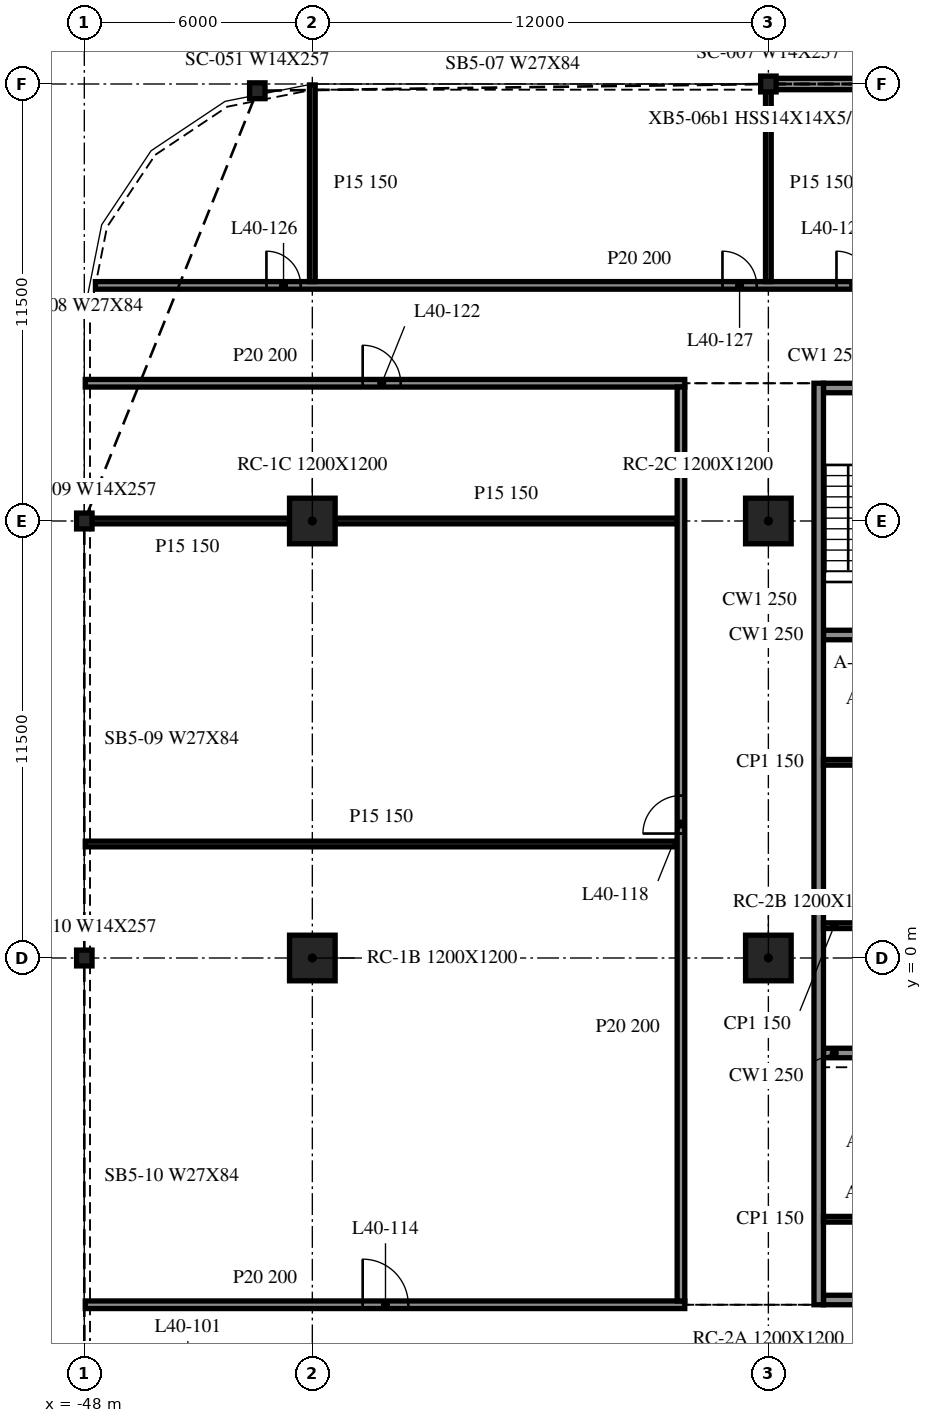
"""IFC4 building model, lengths in metres.
Left out: names, types, materials, properties, quantities, classifications, styles, units other than length and angle.
Written with IfcOpenShell. Run it as: python <this file> out.ifc"""

import sys

from ifc_helpers import new_model, si_unit, direction, frame, frame_2d, origin, origin_2d, place, context, subcontext, project, spatial, rectangle, i_section, extrude, element, fill, save


model = new_model("IFC4")
c1 = context("Model", 3, precision=1e-05, world=origin(), true_north=direction((0.0, 1.0)))
c2 = subcontext(c1, "Body", "Model", "MODEL_VIEW")
j1 = project(units=[si_unit("LENGTHUNIT", "METRE"), si_unit("PLANEANGLEUNIT", "RADIAN")], contexts=[c1])
p1 = place(None, origin())
s1 = spatial("IfcSite", under=j1, at=p1, CompositionType="ELEMENT")
p2 = place(p1, origin())
s2 = spatial("IfcBuilding", under=s1, at=p2, CompositionType="ELEMENT")
p3 = place(p2, frame((0.0, 0.0, 170.6)))
s3 = spatial("IfcBuildingStorey", under=s2, at=p3, CompositionType="ELEMENT", Elevation=170.6)
for number, where, z_axis, x_axis in (
    (1, (-42.0, 0.0, -0.34), (0.0, 0.0, 1.0), (1.0, 0.0, 0.0)),
    (2, (-42.0, 11.5, -0.34), (0.0, 0.0, 1.0), (1.0, 0.0, 0.0)),
    (3, (-30.0, 0.0, -0.34), (0.0, 0.0, 1.0), (1.0, 0.0, 0.0)),
    (4, (-30.0, 11.5, -0.34), (0.0, 0.0, 1.0), (1.0, 0.0, 0.0)),
):
    element("IfcColumn", number, at=place(p3, frame(where, z_axis=z_axis, x_axis=x_axis)), inside=s3, PredefinedType="COLUMN", context=c2, shape_type="SweptSolid", body=[
        extrude(rectangle(XDim=1.2, YDim=1.2, at=origin_2d()), origin(), (0.0, 0.0, 1.0), 3.8),
    ])
for number, where, z_axis, x_axis in (
    (5, (-30.0, 23.0, -0.34), (0.0, 0.0, 1.0), (1.0, 0.0, 0.0)),
    (6, (-43.448, 22.822, -0.34), (0.0, 0.0, 1.0), (1.0, 0.0, 0.0)),
    (7, (-48.0, 11.5, -0.34), (0.0, 0.0, 1.0), (1.0, 0.0, 0.0)),
    (8, (-48.0, 0.0, -0.34), (0.0, 0.0, 1.0), (1.0, 0.0, 0.0)),
):
    element("IfcColumn", number, at=place(p3, frame(where, z_axis=z_axis, x_axis=x_axis)), inside=s3, PredefinedType="COLUMN", context=c2, shape_type="SweptSolid", body=[
        extrude(i_section(OverallWidth=0.406, OverallDepth=0.417, WebThickness=0.03, FlangeThickness=0.048, at=origin_2d()), origin(), (0.0, 0.0, 1.0), 3.8),
    ])
p4 = place(p3, frame((-18.015, 23.0, 0.0), z_axis=(0.0, 0.0, 1.0), x_axis=(-1.0, 0.0, 0.0)))
e9 = element("IfcWall", 9, at=p4, inside=s3, PredefinedType="NOTDEFINED", context=c2, shape_type="SweptSolid", body=[
    extrude(rectangle(XDim=11.97, YDim=0.3, at=frame_2d((5.985, 0.0))), origin(), (0.0, 0.0, 1.0), 2.782),
])
p5 = place(p3, frame((-28.675, 15.125, 0.0), z_axis=(0.0, 0.0, 1.0), x_axis=(0.0, -1.0, 0.0)))
e10 = element("IfcWall", 10, at=p5, inside=s3, PredefinedType="SOLIDWALL", context=c2, shape_type="SweptSolid", body=[
    extrude(rectangle(XDim=24.25, YDim=0.25, at=frame_2d((12.125, 0.0))), origin(), (0.0, 0.0, 1.0), 3.46),
])
p6 = place(p3, frame((-19.45, -9.0, 0.0), z_axis=(0.0, 0.0, 1.0), x_axis=(-1.0, 0.0, 0.0)))
e11 = element("IfcWall", 11, at=p6, inside=s3, PredefinedType="SOLIDWALL", context=c2, shape_type="SweptSolid", body=[
    extrude(rectangle(XDim=9.1, YDim=0.25, at=frame_2d((4.55, 0.0))), origin(), (0.0, 0.0, 1.0), 3.46),
])
p7 = place(p6, frame((3.65, 0.0, 0.0)))
e12 = element("IfcOpeningElement", 12, at=p7, cuts=e11, PredefinedType="OPENING", context=c2, shape_type="SweptSolid", body=[
    extrude(rectangle(XDim=1.8, YDim=2.1, at=frame_2d((0.9, 1.05))), frame((0.0, 0.135, 0.0), z_axis=(0.0, -1.0, 0.0), x_axis=(1.0, 0.0, 0.0)), (0.0, 0.0, 1.0), 0.27),
])
p8 = place(p3, frame((-28.55, 15.0, 0.0), z_axis=(0.0, 0.0, 1.0), x_axis=(1.0, 0.0, 0.0)))
e13 = element("IfcWall", 13, at=p8, inside=s3, PredefinedType="SOLIDWALL", context=c2, shape_type="SweptSolid", body=[
    extrude(rectangle(XDim=9.1, YDim=0.25, at=frame_2d((4.55, 0.0))), origin(), (0.0, 0.0, 1.0), 3.46),
])
p9 = place(p8, frame((3.65, 0.0, 0.0)))
e14 = element("IfcOpeningElement", 14, at=p9, cuts=e13, PredefinedType="OPENING", context=c2, shape_type="SweptSolid", body=[
    extrude(rectangle(XDim=1.8, YDim=2.1, at=frame_2d((0.9, 1.05))), frame((0.0, 0.135, 0.0), z_axis=(0.0, -1.0, 0.0), x_axis=(1.0, 0.0, 0.0)), (0.0, 0.0, 1.0), 0.27),
])
for number, where, z_axis, x_axis in (
    (15, (-28.55, -2.5, 0.0), (0.0, 0.0, 1.0), (1.0, 0.0, 0.0)),
    (16, (-28.55, 8.5, 0.0), (0.0, 0.0, 1.0), (1.0, 0.0, 0.0)),
):
    element("IfcWall", number, at=place(p3, frame(where, z_axis=z_axis, x_axis=x_axis)), inside=s3, PredefinedType="SOLIDWALL", context=c2, shape_type="SweptSolid", body=[
        extrude(rectangle(XDim=2.85, YDim=0.25, at=frame_2d((1.425, 0.0))), origin(), (0.0, 0.0, 1.0), 3.46),
    ])
for number, where, z_axis, x_axis in (
    (17, (-28.55, 0.85, 0.0), (0.0, 0.0, 1.0), (1.0, 0.0, 0.0)),
    (18, (-28.55, 5.15, 0.0), (0.0, 0.0, 1.0), (1.0, 0.0, 0.0)),
    (19, (-28.55, -6.875, 0.0), (0.0, 0.0, 1.0), (1.0, 0.0, 0.0)),
):
    element("IfcWall", number, at=place(p3, frame(where, z_axis=z_axis, x_axis=x_axis)), inside=s3, PredefinedType="PARTITIONING", context=c2, shape_type="SweptSolid", body=[
        extrude(rectangle(XDim=2.85, YDim=0.15, at=frame_2d((1.425, 0.0))), origin(), (0.0, 0.0, 1.0), 3.46),
    ])
p10 = place(p3, frame((-47.975, -9.125, 0.0), z_axis=(0.0, 0.0, 1.0), x_axis=(1.0, 0.0, 0.0)))
e20 = element("IfcWall", 20, at=p10, inside=s3, PredefinedType="PARTITIONING", context=c2, shape_type="SweptSolid", body=[
    extrude(rectangle(XDim=15.775, YDim=0.2, at=frame_2d((7.888, 0.0))), origin(), (0.0, 0.0, 1.0), 3.46),
])
p11 = place(p10, frame((7.3, 0.0, 0.0)))
e21 = element("IfcOpeningElement", 21, at=p11, cuts=e20, PredefinedType="OPENING", context=c2, shape_type="SweptSolid", body=[
    extrude(rectangle(XDim=1.2, YDim=2.1, at=frame_2d((0.6, 1.05))), frame((0.0, 0.11, 0.0), z_axis=(0.0, -1.0, 0.0), x_axis=(1.0, 0.0, 0.0)), (0.0, 0.0, 1.0), 0.22),
])
p12 = place(p3, frame((-47.975, 3.0, 0.0), z_axis=(0.0, 0.0, 1.0), x_axis=(1.0, 0.0, 0.0)))
e22 = element("IfcWall", 22, at=p12, inside=s3, PredefinedType="PARTITIONING", context=c2, shape_type="SweptSolid", body=[
    extrude(rectangle(XDim=15.575, YDim=0.15, at=frame_2d((7.788, 0.0))), origin(), (0.0, 0.0, 1.0), 3.46),
])
p13 = place(p3, frame((-47.975, 11.5, 0.0), z_axis=(0.0, 0.0, 1.0), x_axis=(1.0, 0.0, 0.0)))
e23 = element("IfcWall", 23, at=p13, inside=s3, PredefinedType="PARTITIONING", context=c2, shape_type="SweptSolid", body=[
    extrude(rectangle(XDim=5.375, YDim=0.15, at=frame_2d((2.688, 0.0))), origin(), (0.0, 0.0, 1.0), 3.46),
])
p14 = place(p3, frame((-41.4, 11.5, 0.0), z_axis=(0.0, 0.0, 1.0), x_axis=(1.0, 0.0, 0.0)))
e24 = element("IfcWall", 24, at=p14, inside=s3, PredefinedType="PARTITIONING", context=c2, shape_type="SweptSolid", body=[
    extrude(rectangle(XDim=9.0, YDim=0.15, at=frame_2d((4.5, 0.0))), origin(), (0.0, 0.0, 1.0), 3.46),
])
p15 = place(p3, frame((-47.975, 15.125, 0.0), z_axis=(0.0, 0.0, 1.0), x_axis=(1.0, 0.0, 0.0)))
e25 = element("IfcWall", 25, at=p15, inside=s3, PredefinedType="PARTITIONING", context=c2, shape_type="SweptSolid", body=[
    extrude(rectangle(XDim=15.775, YDim=0.2, at=frame_2d((7.888, 0.0))), origin(), (0.0, 0.0, 1.0), 3.46),
])
p16 = place(p15, frame((7.3, 0.0, 0.0)))
e26 = element("IfcOpeningElement", 26, at=p16, cuts=e25, PredefinedType="OPENING", context=c2, shape_type="SweptSolid", body=[
    extrude(rectangle(XDim=1.0, YDim=2.1, at=frame_2d((0.5, 1.05))), frame((0.0, 0.11, 0.0), z_axis=(0.0, -1.0, 0.0), x_axis=(1.0, 0.0, 0.0)), (0.0, 0.0, 1.0), 0.22),
])
p17 = place(p3, frame((-47.708, 17.7, 0.0), z_axis=(0.0, 0.0, 1.0), x_axis=(1.0, 0.0, 0.0)))
e27 = element("IfcWall", 27, at=p17, inside=s3, PredefinedType="PARTITIONING", context=c2, shape_type="SweptSolid", body=[
    extrude(rectangle(XDim=95.416, YDim=0.2, at=frame_2d((47.708, 0.0))), origin(), (0.0, 0.0, 1.0), 3.46),
])
p18 = place(p17, frame((4.5, 0.0, 0.0)))
e28 = element("IfcOpeningElement", 28, at=p18, cuts=e27, PredefinedType="OPENING", context=c2, shape_type="SweptSolid", body=[
    extrude(rectangle(XDim=0.9, YDim=2.1, at=frame_2d((0.45, 1.05))), frame((0.0, 0.11, 0.0), z_axis=(0.0, -1.0, 0.0), x_axis=(1.0, 0.0, 0.0)), (0.0, 0.0, 1.0), 0.22),
])
p19 = place(p17, frame((16.5, 0.0, 0.0)))
e29 = element("IfcOpeningElement", 29, at=p19, cuts=e27, PredefinedType="OPENING", context=c2, shape_type="SweptSolid", body=[
    extrude(rectangle(XDim=0.9, YDim=2.1, at=frame_2d((0.45, 1.05))), frame((0.0, 0.11, 0.0), z_axis=(0.0, -1.0, 0.0), x_axis=(1.0, 0.0, 0.0)), (0.0, 0.0, 1.0), 0.22),
])
p20 = place(p17, frame((19.5, 0.0, 0.0)))
e30 = element("IfcOpeningElement", 30, at=p20, cuts=e27, PredefinedType="OPENING", context=c2, shape_type="SweptSolid", body=[
    extrude(rectangle(XDim=0.9, YDim=2.1, at=frame_2d((0.45, 1.05))), frame((0.0, 0.11, 0.0), z_axis=(0.0, -1.0, 0.0), x_axis=(1.0, 0.0, 0.0)), (0.0, 0.0, 1.0), 0.22),
])
p21 = place(p17, frame((22.5, 0.0, 0.0)))
e31 = element("IfcOpeningElement", 31, at=p21, cuts=e27, PredefinedType="OPENING", context=c2, shape_type="SweptSolid", body=[
    extrude(rectangle(XDim=0.9, YDim=2.1, at=frame_2d((0.45, 1.05))), frame((0.0, 0.11, 0.0), z_axis=(0.0, -1.0, 0.0), x_axis=(1.0, 0.0, 0.0)), (0.0, 0.0, 1.0), 0.22),
])
p22 = place(p17, frame((28.5, 0.0, 0.0)))
e32 = element("IfcOpeningElement", 32, at=p22, cuts=e27, PredefinedType="OPENING", context=c2, shape_type="SweptSolid", body=[
    extrude(rectangle(XDim=0.9, YDim=2.1, at=frame_2d((0.45, 1.05))), frame((0.0, 0.11, 0.0), z_axis=(0.0, -1.0, 0.0), x_axis=(1.0, 0.0, 0.0)), (0.0, 0.0, 1.0), 0.22),
])
p23 = place(p17, frame((40.5, 0.0, 0.0)))
e33 = element("IfcOpeningElement", 33, at=p23, cuts=e27, PredefinedType="OPENING", context=c2, shape_type="SweptSolid", body=[
    extrude(rectangle(XDim=0.9, YDim=2.1, at=frame_2d((0.45, 1.05))), frame((0.0, 0.11, 0.0), z_axis=(0.0, -1.0, 0.0), x_axis=(1.0, 0.0, 0.0)), (0.0, 0.0, 1.0), 0.22),
])
p24 = place(p17, frame((43.5, 0.0, 0.0)))
e34 = element("IfcOpeningElement", 34, at=p24, cuts=e27, PredefinedType="OPENING", context=c2, shape_type="SweptSolid", body=[
    extrude(rectangle(XDim=0.9, YDim=2.1, at=frame_2d((0.45, 1.05))), frame((0.0, 0.11, 0.0), z_axis=(0.0, -1.0, 0.0), x_axis=(1.0, 0.0, 0.0)), (0.0, 0.0, 1.0), 0.22),
])
p25 = place(p17, frame((46.5, 0.0, 0.0)))
e35 = element("IfcOpeningElement", 35, at=p25, cuts=e27, PredefinedType="OPENING", context=c2, shape_type="SweptSolid", body=[
    extrude(rectangle(XDim=0.9, YDim=2.1, at=frame_2d((0.45, 1.05))), frame((0.0, 0.11, 0.0), z_axis=(0.0, -1.0, 0.0), x_axis=(1.0, 0.0, 0.0)), (0.0, 0.0, 1.0), 0.22),
])
p26 = place(p17, frame((48.1, 0.0, 0.0)))
e36 = element("IfcOpeningElement", 36, at=p26, cuts=e27, PredefinedType="OPENING", context=c2, shape_type="SweptSolid", body=[
    extrude(rectangle(XDim=0.9, YDim=2.1, at=frame_2d((0.45, 1.05))), frame((0.0, 0.11, 0.0), z_axis=(0.0, -1.0, 0.0), x_axis=(1.0, 0.0, 0.0)), (0.0, 0.0, 1.0), 0.22),
])
p27 = place(p17, frame((54.1, 0.0, 0.0)))
e37 = element("IfcOpeningElement", 37, at=p27, cuts=e27, PredefinedType="OPENING", context=c2, shape_type="SweptSolid", body=[
    extrude(rectangle(XDim=0.9, YDim=2.1, at=frame_2d((0.45, 1.05))), frame((0.0, 0.11, 0.0), z_axis=(0.0, -1.0, 0.0), x_axis=(1.0, 0.0, 0.0)), (0.0, 0.0, 1.0), 0.22),
])
p28 = place(p17, frame((66.1, 0.0, 0.0)))
e38 = element("IfcOpeningElement", 38, at=p28, cuts=e27, PredefinedType="OPENING", context=c2, shape_type="SweptSolid", body=[
    extrude(rectangle(XDim=0.9, YDim=2.1, at=frame_2d((0.45, 1.05))), frame((0.0, 0.11, 0.0), z_axis=(0.0, -1.0, 0.0), x_axis=(1.0, 0.0, 0.0)), (0.0, 0.0, 1.0), 0.22),
])
p29 = place(p17, frame((69.1, 0.0, 0.0)))
e39 = element("IfcOpeningElement", 39, at=p29, cuts=e27, PredefinedType="OPENING", context=c2, shape_type="SweptSolid", body=[
    extrude(rectangle(XDim=0.9, YDim=2.1, at=frame_2d((0.45, 1.05))), frame((0.0, 0.11, 0.0), z_axis=(0.0, -1.0, 0.0), x_axis=(1.0, 0.0, 0.0)), (0.0, 0.0, 1.0), 0.22),
])
p30 = place(p17, frame((72.1, 0.0, 0.0)))
e40 = element("IfcOpeningElement", 40, at=p30, cuts=e27, PredefinedType="OPENING", context=c2, shape_type="SweptSolid", body=[
    extrude(rectangle(XDim=0.9, YDim=2.1, at=frame_2d((0.45, 1.05))), frame((0.0, 0.11, 0.0), z_axis=(0.0, -1.0, 0.0), x_axis=(1.0, 0.0, 0.0)), (0.0, 0.0, 1.0), 0.22),
])
p31 = place(p17, frame((78.1, 0.0, 0.0)))
e41 = element("IfcOpeningElement", 41, at=p31, cuts=e27, PredefinedType="OPENING", context=c2, shape_type="SweptSolid", body=[
    extrude(rectangle(XDim=0.9, YDim=2.1, at=frame_2d((0.45, 1.05))), frame((0.0, 0.11, 0.0), z_axis=(0.0, -1.0, 0.0), x_axis=(1.0, 0.0, 0.0)), (0.0, 0.0, 1.0), 0.22),
])
p32 = place(p17, frame((90.1, 0.0, 0.0)))
e42 = element("IfcOpeningElement", 42, at=p32, cuts=e27, PredefinedType="OPENING", context=c2, shape_type="SweptSolid", body=[
    extrude(rectangle(XDim=0.9, YDim=2.1, at=frame_2d((0.45, 1.05))), frame((0.0, 0.11, 0.0), z_axis=(0.0, -1.0, 0.0), x_axis=(1.0, 0.0, 0.0)), (0.0, 0.0, 1.0), 0.22),
])
p33 = place(p3, frame((-42.0, 17.8, 0.0), z_axis=(0.0, 0.0, 1.0), x_axis=(0.0, 1.0, 0.0)))
e43 = element("IfcWall", 43, at=p33, inside=s3, PredefinedType="PARTITIONING", context=c2, shape_type="SweptSolid", body=[
    extrude(rectangle(XDim=5.175, YDim=0.15, at=frame_2d((2.587, 0.0))), origin(), (0.0, 0.0, 1.0), 3.46),
])
p34 = place(p3, frame((-32.3, -9.025, 0.0), z_axis=(0.0, 0.0, 1.0), x_axis=(0.0, 1.0, 0.0)))
e44 = element("IfcWall", 44, at=p34, inside=s3, PredefinedType="PARTITIONING", context=c2, shape_type="SweptSolid", body=[
    extrude(rectangle(XDim=24.05, YDim=0.2, at=frame_2d((12.025, 0.0))), origin(), (0.0, 0.0, 1.0), 3.46),
])
p35 = place(p34, frame((12.3, 0.0, 0.0)))
e45 = element("IfcOpeningElement", 45, at=p35, cuts=e44, PredefinedType="OPENING", context=c2, shape_type="SweptSolid", body=[
    extrude(rectangle(XDim=1.0, YDim=2.1, at=frame_2d((0.5, 1.05))), frame((0.0, 0.11, 0.0), z_axis=(0.0, -1.0, 0.0), x_axis=(1.0, 0.0, 0.0)), (0.0, 0.0, 1.0), 0.22),
])
p36 = place(p3, frame((-30.0, 17.8, 0.0), z_axis=(0.0, 0.0, 1.0), x_axis=(0.0, 1.0, 0.0)))
e46 = element("IfcWall", 46, at=p36, inside=s3, PredefinedType="PARTITIONING", context=c2, shape_type="SweptSolid", body=[
    extrude(rectangle(XDim=5.175, YDim=0.15, at=frame_2d((2.587, 0.0))), origin(), (0.0, 0.0, 1.0), 3.46),
])
p37 = place(p11, origin())
e47 = element("IfcDoor", 47, at=p37, inside=s3, OperationType="SINGLE_SWING_RIGHT", PredefinedType="DOOR", context=c2, shape_type="SweptSolid", body=[
    extrude(rectangle(XDim=1.2, YDim=2.1, at=frame_2d((0.6, 1.05))), frame((0.0, 0.025, 0.0), z_axis=(0.0, -1.0, 0.0), x_axis=(1.0, 0.0, 0.0)), (0.0, 0.0, 1.0), 0.05),
])
fill(e21, e47)
p38 = place(p35, origin())
e48 = element("IfcDoor", 48, at=p38, inside=s3, OperationType="SINGLE_SWING_RIGHT", PredefinedType="DOOR", context=c2, shape_type="SweptSolid", body=[
    extrude(rectangle(XDim=1.0, YDim=2.1, at=frame_2d((0.5, 1.05))), frame((0.0, 0.025, 0.0), z_axis=(0.0, -1.0, 0.0), x_axis=(1.0, 0.0, 0.0)), (0.0, 0.0, 1.0), 0.05),
])
fill(e45, e48)
p39 = place(p16, origin())
e49 = element("IfcDoor", 49, at=p39, inside=s3, OperationType="SINGLE_SWING_RIGHT", PredefinedType="DOOR", context=c2, shape_type="SweptSolid", body=[
    extrude(rectangle(XDim=1.0, YDim=2.1, at=frame_2d((0.5, 1.05))), frame((0.0, 0.025, 0.0), z_axis=(0.0, -1.0, 0.0), x_axis=(1.0, 0.0, 0.0)), (0.0, 0.0, 1.0), 0.05),
])
fill(e26, e49)
p40 = place(p18, origin())
e50 = element("IfcDoor", 50, at=p40, inside=s3, OperationType="SINGLE_SWING_LEFT", PredefinedType="DOOR", context=c2, shape_type="SweptSolid", body=[
    extrude(rectangle(XDim=0.9, YDim=2.1, at=frame_2d((0.45, 1.05))), frame((0.0, 0.025, 0.0), z_axis=(0.0, -1.0, 0.0), x_axis=(1.0, 0.0, 0.0)), (0.0, 0.0, 1.0), 0.05),
])
fill(e28, e50)
p41 = place(p19, origin())
e51 = element("IfcDoor", 51, at=p41, inside=s3, OperationType="SINGLE_SWING_LEFT", PredefinedType="DOOR", context=c2, shape_type="SweptSolid", body=[
    extrude(rectangle(XDim=0.9, YDim=2.1, at=frame_2d((0.45, 1.05))), frame((0.0, 0.025, 0.0), z_axis=(0.0, -1.0, 0.0), x_axis=(1.0, 0.0, 0.0)), (0.0, 0.0, 1.0), 0.05),
])
fill(e29, e51)
p42 = place(p20, origin())
e52 = element("IfcDoor", 52, at=p42, inside=s3, OperationType="SINGLE_SWING_LEFT", PredefinedType="DOOR", context=c2, shape_type="SweptSolid", body=[
    extrude(rectangle(XDim=0.9, YDim=2.1, at=frame_2d((0.45, 1.05))), frame((0.0, 0.025, 0.0), z_axis=(0.0, -1.0, 0.0), x_axis=(1.0, 0.0, 0.0)), (0.0, 0.0, 1.0), 0.05),
])
fill(e30, e52)
save(model, sys.argv[1])
